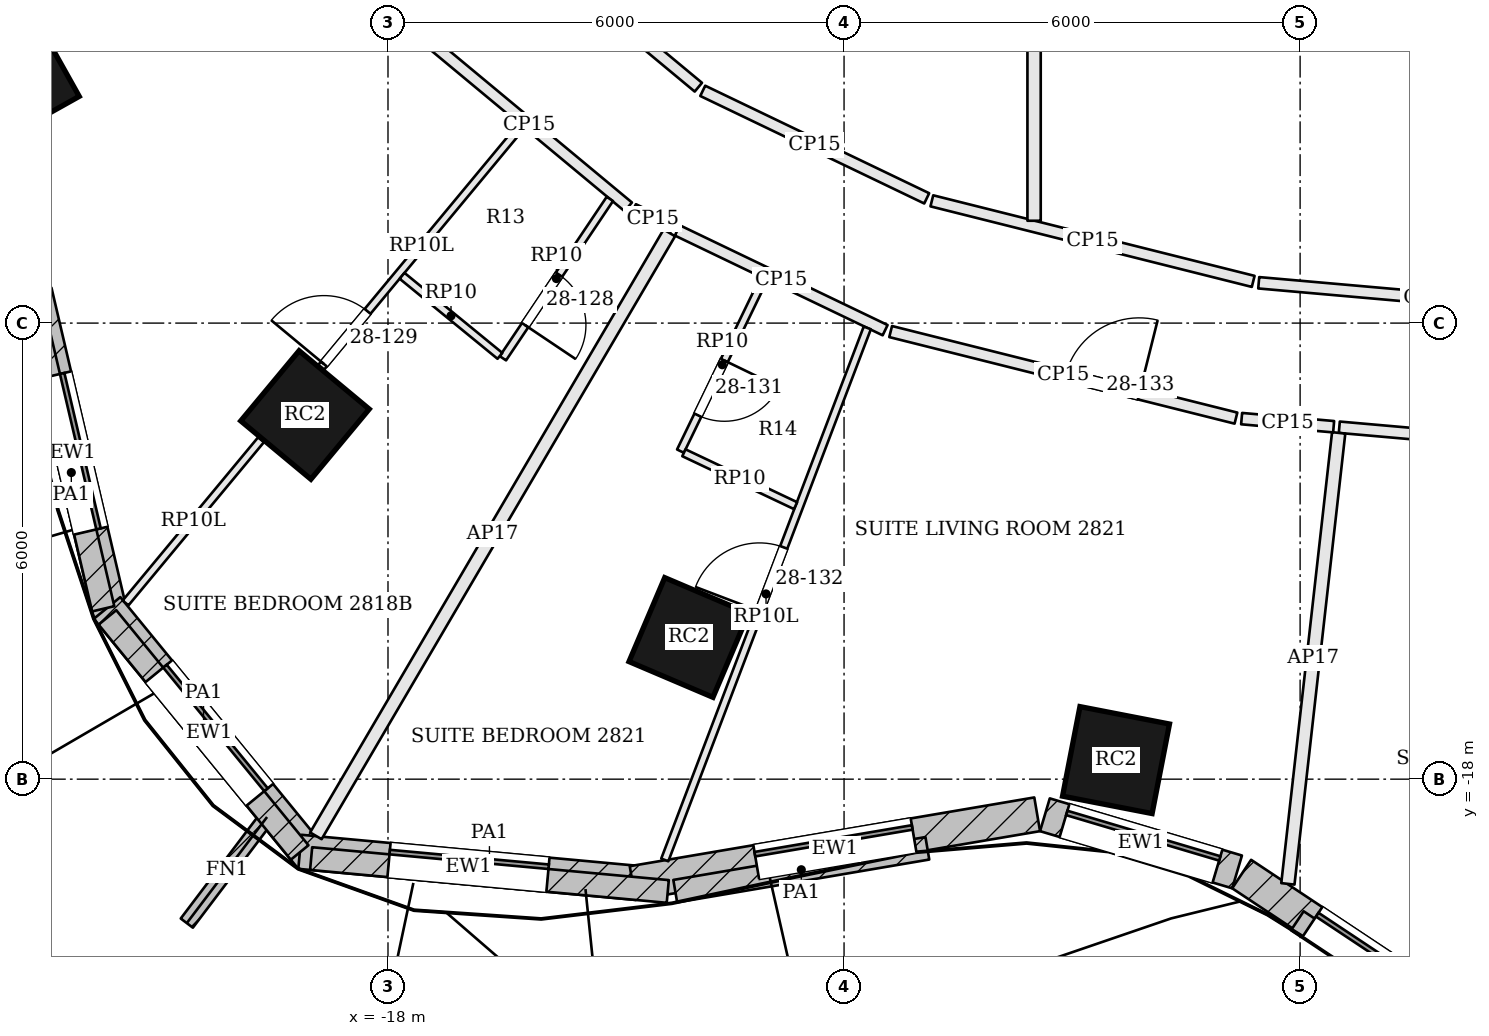
"""IFC4 building model, lengths in metres.
Left out: names, types, materials, properties, quantities, classifications, styles, units other than length and angle.
Written with IfcOpenShell. Run it as: python <this file> out.ifc"""

import sys

from ifc_helpers import new_model, si_unit, direction, frame, frame_2d, origin, origin_2d, place, context, subcontext, project, spatial, rectangle, extrude, element, fill, save


model = new_model("IFC4")
c1 = context("Model", 3, precision=1e-05, world=origin(), true_north=direction((0.0, 1.0)))
c2 = subcontext(c1, "Body", "Model", "MODEL_VIEW")
j1 = project(units=[si_unit("LENGTHUNIT", "METRE"), si_unit("PLANEANGLEUNIT", "RADIAN")], contexts=[c1])
p1 = place(None, origin())
s1 = spatial("IfcSite", under=j1, at=p1, CompositionType="ELEMENT")
p2 = place(p1, origin())
s2 = spatial("IfcBuilding", under=s1, at=p2, CompositionType="ELEMENT")
p3 = place(p2, frame((0.0, 0.0, 117.6)))
s3 = spatial("IfcBuildingStorey", under=s2, at=p3, CompositionType="ELEMENT", Elevation=117.6)
for number, where, z_axis, x_axis in (
    (1, (-22.879, -8.787, 0.0), (0.0, 0.0, 1.0), (0.489, -0.873, 0.0)),
    (2, (-19.092, -13.209, 0.0), (0.0, 0.0, 1.0), (0.769, -0.639, 0.0)),
    (3, (-14.042, -16.136, 0.0), (0.0, 0.0, 1.0), (0.92, -0.392, 0.0)),
    (4, (-8.422, -17.749, 0.0), (0.0, 0.0, 1.0), (0.982, -0.191, 0.0)),
):
    element("IfcColumn", number, at=place(p3, frame(where, z_axis=z_axis, x_axis=x_axis)), inside=s3, PredefinedType="COLUMN", context=c2, shape_type="SweptSolid", body=[
        extrude(rectangle(XDim=1.2, YDim=1.2, at=origin_2d()), origin(), (0.0, 0.0, 1.0), 2.8),
    ])
p4 = place(p3, frame((-22.646, -11.586, 0.0), z_axis=(0.0, 0.0, 1.0), x_axis=(0.227925124198, -0.973678662475, 0.0)))
e5 = element("IfcWall", 5, at=p4, inside=s3, PredefinedType="SOLIDWALL", context=c2, shape_type="SweptSolid", body=[
    extrude(rectangle(XDim=4.361, YDim=0.45, at=frame_2d((2.18, 0.0))), origin(), (0.0, 0.0, 1.0), 3.3),
])
p5 = place(p4, frame((1.13, 0.0, 0.9)))
e6 = element("IfcOpeningElement", 6, at=p5, cuts=e5, PredefinedType="OPENING", context=c2, shape_type="SweptSolid", body=[
    extrude(rectangle(XDim=2.1, YDim=1.8, at=frame_2d((1.05, 0.9))), frame((0.0, 0.235, 0.0), z_axis=(0.0, -1.0, 0.0), x_axis=(1.0, 0.0, 0.0)), (0.0, 0.0, 1.0), 0.47),
])
p6 = place(p3, frame((-21.696, -15.748, 0.0), z_axis=(0.0, 0.0, 1.0), x_axis=(0.632968710519, -0.774177377288, 0.0)))
e7 = element("IfcWall", 7, at=p6, inside=s3, PredefinedType="SOLIDWALL", context=c2, shape_type="SweptSolid", body=[
    extrude(rectangle(XDim=4.25, YDim=0.45, at=frame_2d((2.125, 0.0))), origin(), (0.0, 0.0, 1.0), 3.3),
])
p7 = place(p6, frame((1.075, 0.0, 0.9)))
e8 = element("IfcOpeningElement", 8, at=p7, cuts=e7, PredefinedType="OPENING", context=c2, shape_type="SweptSolid", body=[
    extrude(rectangle(XDim=2.1, YDim=1.8, at=frame_2d((1.05, 0.9))), frame((0.0, 0.235, 0.0), z_axis=(0.0, -1.0, 0.0), x_axis=(1.0, 0.0, 0.0)), (0.0, 0.0, 1.0), 0.47),
])
p8 = place(p3, frame((-19.159, -18.956, 0.0), z_axis=(0.0, 0.0, 1.0), x_axis=(0.995777399421, -0.091800712424, 0.0)))
e9 = element("IfcWall", 9, at=p8, inside=s3, PredefinedType="SOLIDWALL", context=c2, shape_type="SweptSolid", body=[
    extrude(rectangle(XDim=4.455, YDim=0.45, at=frame_2d((2.227, 0.0))), origin(), (0.0, 0.0, 1.0), 3.3),
])
p9 = place(p8, frame((1.177, 0.0, 0.9)))
e10 = element("IfcOpeningElement", 10, at=p9, cuts=e9, PredefinedType="OPENING", context=c2, shape_type="SweptSolid", body=[
    extrude(rectangle(XDim=2.1, YDim=1.8, at=frame_2d((1.05, 0.9))), frame((0.0, 0.235, 0.0), z_axis=(0.0, -1.0, 0.0), x_axis=(1.0, 0.0, 0.0)), (0.0, 0.0, 1.0), 0.47),
])
p10 = place(p3, frame((-14.782, -19.367, 0.0), z_axis=(0.0, 0.0, 1.0), x_axis=(0.98585584667, 0.167595493934, 0.0)))
e11 = element("IfcWall", 11, at=p10, inside=s3, PredefinedType="SOLIDWALL", context=c2, shape_type="SweptSolid", body=[
    extrude(rectangle(XDim=5.399, YDim=0.45, at=frame_2d((2.699, 0.0))), origin(), (0.0, 0.0, 1.0), 3.3),
])
p11 = place(p10, frame((1.649, 0.0, 0.9)))
e12 = element("IfcOpeningElement", 12, at=p11, cuts=e11, PredefinedType="OPENING", context=c2, shape_type="SweptSolid", body=[
    extrude(rectangle(XDim=2.1, YDim=1.8, at=frame_2d((1.05, 0.9))), frame((0.0, 0.235, 0.0), z_axis=(0.0, -1.0, 0.0), x_axis=(1.0, 0.0, 0.0)), (0.0, 0.0, 1.0), 0.47),
])
p12 = place(p3, frame((-9.357, -18.469, 0.0), z_axis=(0.0, 0.0, 1.0), x_axis=(0.958524054629, -0.285011643091, 0.0)))
e13 = element("IfcWall", 13, at=p12, inside=s3, PredefinedType="SOLIDWALL", context=c2, shape_type="SweptSolid", body=[
    extrude(rectangle(XDim=2.637, YDim=0.45, at=frame_2d((1.319, 0.0))), origin(), (0.0, 0.0, 1.0), 3.3),
])
p13 = place(p12, frame((0.269, 0.0, 0.9)))
e14 = element("IfcOpeningElement", 14, at=p13, cuts=e13, PredefinedType="OPENING", context=c2, shape_type="SweptSolid", body=[
    extrude(rectangle(XDim=2.1, YDim=1.8, at=frame_2d((1.05, 0.9))), frame((0.0, 0.235, 0.0), z_axis=(0.0, -1.0, 0.0), x_axis=(1.0, 0.0, 0.0)), (0.0, 0.0, 1.0), 0.47),
])
p14 = place(p3, frame((-6.769, -19.248, 0.0), z_axis=(0.0, 0.0, 1.0), x_axis=(0.832973379274, -0.553313066375, 0.0)))
e15 = element("IfcWall", 15, at=p14, inside=s3, PredefinedType="SOLIDWALL", context=c2, shape_type="SweptSolid", body=[
    extrude(rectangle(XDim=4.348, YDim=0.45, at=frame_2d((2.174, 0.0))), origin(), (0.0, 0.0, 1.0), 3.3),
])
p15 = place(p14, frame((1.124, 0.0, 0.9)))
e16 = element("IfcOpeningElement", 16, at=p15, cuts=e15, PredefinedType="OPENING", context=c2, shape_type="SweptSolid", body=[
    extrude(rectangle(XDim=2.1, YDim=1.8, at=frame_2d((1.05, 0.9))), frame((0.0, 0.235, 0.0), z_axis=(0.0, -1.0, 0.0), x_axis=(1.0, 0.0, 0.0)), (0.0, 0.0, 1.0), 0.47),
])
p16 = place(p3, frame((-19.591, -18.498, 0.0), z_axis=(0.0, 0.0, 1.0), x_axis=(-0.603387525063, -0.797448114048, 0.0)))
e17 = element("IfcWall", 17, at=p16, inside=s3, PredefinedType="SOLIDWALL", context=c2, shape_type="SweptSolid", body=[
    extrude(rectangle(XDim=1.75, YDim=0.2, at=frame_2d((0.875, 0.0))), origin(), (0.0, 0.0, 1.0), 3.3),
])
p17 = place(p3, frame((-22.586, -12.174, 3.6), z_axis=(0.0, 0.0, 1.0), x_axis=(0.227889817295, -0.973686926673, 0.0)))
e18 = element("IfcWall", 18, at=p17, inside=s3, PredefinedType="PARAPET", context=c2, shape_type="SweptSolid", body=[
    extrude(rectangle(XDim=3.682, YDim=0.3, at=frame_2d((1.841, 0.0))), origin(), (0.0, 0.0, 1.0), 1.1),
])
p18 = place(p3, frame((-21.691, -15.872, 3.6), z_axis=(0.0, 0.0, 1.0), x_axis=(0.632984818356, -0.774164207214, 0.0)))
e19 = element("IfcWall", 19, at=p18, inside=s3, PredefinedType="PARAPET", context=c2, shape_type="SweptSolid", body=[
    extrude(rectangle(XDim=3.995, YDim=0.3, at=frame_2d((1.997, 0.0))), origin(), (0.0, 0.0, 1.0), 1.1),
])
p19 = place(p3, frame((-19.011, -19.045, 3.6), z_axis=(0.0, 0.0, 1.0), x_axis=(0.995781185236, -0.091759637809, 0.0)))
e20 = element("IfcWall", 20, at=p19, inside=s3, PredefinedType="PARAPET", context=c2, shape_type="SweptSolid", body=[
    extrude(rectangle(XDim=4.712, YDim=0.3, at=frame_2d((2.356, 0.0))), origin(), (0.0, 0.0, 1.0), 1.1),
])
p20 = place(p3, frame((-14.221, -19.473, 3.6), z_axis=(0.0, 0.0, 1.0), x_axis=(0.985863279186, 0.167551767381, 0.0)))
e21 = element("IfcWall", 21, at=p20, inside=s3, PredefinedType="PARAPET", context=c2, shape_type="SweptSolid", body=[
    extrude(rectangle(XDim=3.365, YDim=0.3, at=frame_2d((1.682, 0.0))), origin(), (0.0, 0.0, 1.0), 1.1),
])
p21 = place(p3, frame((-6.037, -19.863, 3.6), z_axis=(0.0, 0.0, 1.0), x_axis=(0.832989992548, -0.553288055459, 0.0)))
e22 = element("IfcWall", 22, at=p21, inside=s3, PredefinedType="PARAPET", context=c2, shape_type="SweptSolid", body=[
    extrude(rectangle(XDim=3.154, YDim=0.3, at=frame_2d((1.577, 0.0))), origin(), (0.0, 0.0, 1.0), 1.1),
])
p22 = place(p3, frame((-5.484, -13.37, 0.0), z_axis=(0.0, 0.0, 1.0), x_axis=(0.996140545205, -0.087772513919, 0.0)))
e23 = element("IfcWall", 23, at=p22, inside=s3, PredefinedType="PARTITIONING", context=c2, shape_type="SweptSolid", body=[
    extrude(rectangle(XDim=3.466, YDim=0.15, at=frame_2d((1.733, 0.0))), origin(), (0.0, 0.0, 1.0), 2.684),
])
p23 = place(p3, frame((-6.161, -19.377, 0.0), z_axis=(0.0, 0.0, 1.0), x_axis=(0.111916919639, 0.993717567067, 0.0)))
e24 = element("IfcWall", 24, at=p23, inside=s3, PredefinedType="PARTITIONING", context=c2, shape_type="SweptSolid", body=[
    extrude(rectangle(XDim=5.971, YDim=0.175, at=frame_2d((2.985, 0.0))), origin(), (0.0, 0.0, 1.0), 2.684),
])
p24 = place(p3, frame((-17.446, -8.304, 0.0), z_axis=(0.0, 0.0, 1.0), x_axis=(0.769200174495, -0.639007896318, 0.0)))
e25 = element("IfcWall", 25, at=p24, inside=s3, PredefinedType="PARTITIONING", context=c2, shape_type="SweptSolid", body=[
    extrude(rectangle(XDim=3.39, YDim=0.15, at=frame_2d((1.695, 0.0))), origin(), (0.0, 0.0, 1.0), 2.684),
])
p25 = place(p3, frame((-14.771, -10.503, 0.0), z_axis=(0.0, 0.0, 1.0), x_axis=(0.901637414301, -0.432492743445, 0.0)))
e26 = element("IfcWall", 26, at=p25, inside=s3, PredefinedType="PARTITIONING", context=c2, shape_type="SweptSolid", body=[
    extrude(rectangle(XDim=0.566, YDim=0.15, at=frame_2d((0.283, 0.0))), origin(), (0.0, 0.0, 1.0), 2.684),
])
p26 = place(p3, frame((-18.949, -18.745, 0.0), z_axis=(0.0, 0.0, 1.0), x_axis=(0.505730402321, 0.862691578821, 0.0)))
e27 = element("IfcWall", 27, at=p26, inside=s3, PredefinedType="PARTITIONING", context=c2, shape_type="SweptSolid", body=[
    extrude(rectangle(XDim=9.195, YDim=0.175, at=frame_2d((4.597, 0.0))), origin(), (0.0, 0.0, 1.0), 2.684),
])
p27 = place(p3, frame((-14.193, -10.781, 0.0), z_axis=(0.0, 0.0, 1.0), x_axis=(0.901494156461, -0.432791272863, 0.0)))
e28 = element("IfcWall", 28, at=p27, inside=s3, PredefinedType="PARTITIONING", context=c2, shape_type="SweptSolid", body=[
    extrude(rectangle(XDim=3.032, YDim=0.15, at=frame_2d((1.516, 0.0))), origin(), (0.0, 0.0, 1.0), 2.684),
])
p28 = place(p3, frame((-11.387, -12.111, 0.0), z_axis=(0.0, 0.0, 1.0), x_axis=(0.96999205549, -0.243136612393, 0.0)))
e29 = element("IfcWall", 29, at=p28, inside=s3, PredefinedType="PARTITIONING", context=c2, shape_type="SweptSolid", body=[
    extrude(rectangle(XDim=4.683, YDim=0.15, at=frame_2d((2.342, 0.0))), origin(), (0.0, 0.0, 1.0), 2.684),
])
p29 = place(p28, frame((2.371, 0.0, 0.0)))
e30 = element("IfcOpeningElement", 30, at=p29, cuts=e29, PredefinedType="OPENING", context=c2, shape_type="SweptSolid", body=[
    extrude(rectangle(XDim=1.0, YDim=2.1, at=frame_2d((0.5, 1.05))), frame((0.0, 0.085, 0.0), z_axis=(0.0, -1.0, 0.0), x_axis=(1.0, 0.0, 0.0)), (0.0, 0.0, 1.0), 0.17),
])
p30 = place(p3, frame((-6.77, -13.257, 0.0), z_axis=(0.0, 0.0, 1.0), x_axis=(0.996138123663, -0.08779999194, 0.0)))
e31 = element("IfcWall", 31, at=p30, inside=s3, PredefinedType="PARTITIONING", context=c2, shape_type="SweptSolid", body=[
    extrude(rectangle(XDim=1.215, YDim=0.15, at=frame_2d((0.607, 0.0))), origin(), (0.0, 0.0, 1.0), 2.684),
])
p31 = place(p3, frame((-2.051, -11.865, 0.0), z_axis=(0.0, 0.0, 1.0), x_axis=(-0.996139599493, 0.087783246245, 0.0)))
e32 = element("IfcWall", 32, at=p31, inside=s3, PredefinedType="PARTITIONING", context=c2, shape_type="SweptSolid", body=[
    extrude(rectangle(XDim=4.511, YDim=0.15, at=frame_2d((2.255, 0.0))), origin(), (0.0, 0.0, 1.0), 2.684),
])
p32 = place(p3, frame((-6.617, -11.451, 0.0), z_axis=(0.0, 0.0, 1.0), x_axis=(-0.969987441267, 0.243155020069, 0.0)))
e33 = element("IfcWall", 33, at=p32, inside=s3, PredefinedType="PARTITIONING", context=c2, shape_type="SweptSolid", body=[
    extrude(rectangle(XDim=4.359, YDim=0.15, at=frame_2d((2.179, 0.0))), origin(), (0.0, 0.0, 1.0), 2.684),
])
p33 = place(p3, frame((-10.913, -10.359, 0.0), z_axis=(0.0, 0.0, 1.0), x_axis=(-0.90149741277, 0.432784489982, 0.0)))
e34 = element("IfcWall", 34, at=p33, inside=s3, PredefinedType="PARTITIONING", context=c2, shape_type="SweptSolid", body=[
    extrude(rectangle(XDim=3.269, YDim=0.15, at=frame_2d((1.634, 0.0))), origin(), (0.0, 0.0, 1.0), 2.684),
])
p34 = place(p3, frame((-13.917, -8.896, 0.0), z_axis=(0.0, 0.0, 1.0), x_axis=(-0.769130409479, 0.639091866021, 0.0)))
e35 = element("IfcWall", 35, at=p34, inside=s3, PredefinedType="PARTITIONING", context=c2, shape_type="SweptSolid", body=[
    extrude(rectangle(XDim=2.925, YDim=0.15, at=frame_2d((1.462, 0.0))), origin(), (0.0, 0.0, 1.0), 2.684),
])
p35 = place(p3, frame((-21.453, -15.682, 0.0), z_axis=(0.0, 0.0, 1.0), x_axis=(0.638677193702, 0.769474783371, 0.0)))
e36 = element("IfcWall", 36, at=p35, inside=s3, PredefinedType="PARTITIONING", context=c2, shape_type="SweptSolid", body=[
    extrude(rectangle(XDim=2.791, YDim=0.1, at=frame_2d((1.395, 0.0))), origin(), (0.0, 0.0, 1.0), 2.28),
])
p36 = place(p3, frame((-18.878, -12.58, 0.0), z_axis=(0.0, 0.0, 1.0), x_axis=(0.638746790079, 0.769417011876, 0.0)))
e37 = element("IfcWall", 37, at=p36, inside=s3, PredefinedType="PARTITIONING", context=c2, shape_type="SweptSolid", body=[
    extrude(rectangle(XDim=4.129, YDim=0.1, at=frame_2d((2.064, 0.0))), origin(), (0.0, 0.0, 1.0), 2.28),
])
p37 = place(p36, frame((0.055, 0.0, 0.0)))
e38 = element("IfcOpeningElement", 38, at=p37, cuts=e37, PredefinedType="OPENING", context=c2, shape_type="SweptSolid", body=[
    extrude(rectangle(XDim=0.9, YDim=2.1, at=frame_2d((0.45, 1.05))), frame((0.0, 0.06, 0.0), z_axis=(0.0, -1.0, 0.0), x_axis=(1.0, 0.0, 0.0)), (0.0, 0.0, 1.0), 0.12),
])
p38 = place(p3, frame((-15.081, -10.366, 0.0), z_axis=(0.0, 0.0, 1.0), x_axis=(-0.557375152116, -0.830260766147, 0.0)))
e39 = element("IfcWall", 39, at=p38, inside=s3, PredefinedType="PARTITIONING", context=c2, shape_type="SweptSolid", body=[
    extrude(rectangle(XDim=2.525, YDim=0.1, at=frame_2d((1.262, 0.0))), origin(), (0.0, 0.0, 1.0), 2.684),
])
p39 = place(p38, frame((1.2, 0.0, 0.0)))
e40 = element("IfcOpeningElement", 40, at=p39, cuts=e39, PredefinedType="OPENING", context=c2, shape_type="SweptSolid", body=[
    extrude(rectangle(XDim=0.8, YDim=2.1, at=frame_2d((0.4, 1.05))), frame((0.0, 0.06, 0.0), z_axis=(0.0, -1.0, 0.0), x_axis=(1.0, 0.0, 0.0)), (0.0, 0.0, 1.0), 0.12),
])
p40 = place(p3, frame((-16.527, -12.431, 0.0), z_axis=(0.0, 0.0, 1.0), x_axis=(-0.774094584634, 0.633069959831, 0.0)))
e41 = element("IfcWall", 41, at=p40, inside=s3, PredefinedType="PARTITIONING", context=c2, shape_type="SweptSolid", body=[
    extrude(rectangle(XDim=1.664, YDim=0.1, at=frame_2d((0.832, 0.0))), origin(), (0.0, 0.0, 1.0), 2.684),
])
p41 = place(p3, frame((-14.359, -19.063, 0.0), z_axis=(0.0, 0.0, 1.0), x_axis=(0.355741824807, 0.934584268048, 0.0)))
e42 = element("IfcWall", 42, at=p41, inside=s3, PredefinedType="PARTITIONING", context=c2, shape_type="SweptSolid", body=[
    extrude(rectangle(XDim=7.49, YDim=0.1, at=frame_2d((3.745, 0.0))), origin(), (0.0, 0.0, 1.0), 2.28),
])
p42 = place(p41, frame((3.5, 0.0, 0.0)))
e43 = element("IfcOpeningElement", 43, at=p42, cuts=e42, PredefinedType="OPENING", context=c2, shape_type="SweptSolid", body=[
    extrude(rectangle(XDim=0.9, YDim=2.1, at=frame_2d((0.45, 1.05))), frame((0.0, 0.06, 0.0), z_axis=(0.0, -1.0, 0.0), x_axis=(1.0, 0.0, 0.0)), (0.0, 0.0, 1.0), 0.12),
])
p43 = place(p3, frame((-13.052, -11.412, 0.0), z_axis=(0.0, 0.0, 1.0), x_axis=(-0.435495216355, -0.900191044463, 0.0)))
e44 = element("IfcWall", 44, at=p43, inside=s3, PredefinedType="PARTITIONING", context=c2, shape_type="SweptSolid", body=[
    extrude(rectangle(XDim=2.525, YDim=0.1, at=frame_2d((1.262, 0.0))), origin(), (0.0, 0.0, 1.0), 2.684),
])
p44 = place(p43, frame((1.2, 0.0, 0.0)))
e45 = element("IfcOpeningElement", 45, at=p44, cuts=e44, PredefinedType="OPENING", context=c2, shape_type="SweptSolid", body=[
    extrude(rectangle(XDim=0.8, YDim=2.1, at=frame_2d((0.4, 1.05))), frame((0.0, 0.06, 0.0), z_axis=(0.0, -1.0, 0.0), x_axis=(1.0, 0.0, 0.0)), (0.0, 0.0, 1.0), 0.12),
])
p45 = place(p3, frame((-14.107, -13.706, 0.0), z_axis=(0.0, 0.0, 1.0), x_axis=(0.903774530785, -0.428008875497, 0.0)))
e46 = element("IfcWall", 46, at=p45, inside=s3, PredefinedType="PARTITIONING", context=c2, shape_type="SweptSolid", body=[
    extrude(rectangle(XDim=1.626, YDim=0.1, at=frame_2d((0.813, 0.0))), origin(), (0.0, 0.0, 1.0), 2.684),
])
p46 = place(p3, frame((-9.5, -10.654, 0.0), z_axis=(0.0, 0.0, 1.0), x_axis=(0.0, 1.0, 0.0)))
e47 = element("IfcWall", 47, at=p46, inside=s3, PredefinedType="PARTITIONING", context=c2, shape_type="SweptSolid", body=[
    extrude(rectangle(XDim=5.779, YDim=0.175, at=frame_2d((2.889, 0.0))), origin(), (0.0, 0.0, 1.0), 2.684),
])
p47 = place(p5, origin())
e48 = element("IfcWindow", 48, at=p47, inside=s3, PartitioningType="SINGLE_PANEL", PredefinedType="WINDOW", context=c2, shape_type="SweptSolid", body=[
    extrude(rectangle(XDim=2.1, YDim=1.8, at=frame_2d((1.05, 0.9))), frame((0.0, 0.135, 0.0), z_axis=(0.0, -1.0, 0.0), x_axis=(1.0, 0.0, 0.0)), (0.0, 0.0, 1.0), 0.06),
])
fill(e6, e48)
p48 = place(p7, origin())
e49 = element("IfcWindow", 49, at=p48, inside=s3, PartitioningType="SINGLE_PANEL", PredefinedType="WINDOW", context=c2, shape_type="SweptSolid", body=[
    extrude(rectangle(XDim=2.1, YDim=1.8, at=frame_2d((1.05, 0.9))), frame((0.0, 0.135, 0.0), z_axis=(0.0, -1.0, 0.0), x_axis=(1.0, 0.0, 0.0)), (0.0, 0.0, 1.0), 0.06),
])
fill(e8, e49)
p49 = place(p9, origin())
e50 = element("IfcWindow", 50, at=p49, inside=s3, PartitioningType="SINGLE_PANEL", PredefinedType="WINDOW", context=c2, shape_type="SweptSolid", body=[
    extrude(rectangle(XDim=2.1, YDim=1.8, at=frame_2d((1.05, 0.9))), frame((0.0, 0.135, 0.0), z_axis=(0.0, -1.0, 0.0), x_axis=(1.0, 0.0, 0.0)), (0.0, 0.0, 1.0), 0.06),
])
fill(e10, e50)
p50 = place(p11, origin())
e51 = element("IfcWindow", 51, at=p50, inside=s3, PartitioningType="SINGLE_PANEL", PredefinedType="WINDOW", context=c2, shape_type="SweptSolid", body=[
    extrude(rectangle(XDim=2.1, YDim=1.8, at=frame_2d((1.05, 0.9))), frame((0.0, 0.135, 0.0), z_axis=(0.0, -1.0, 0.0), x_axis=(1.0, 0.0, 0.0)), (0.0, 0.0, 1.0), 0.06),
])
fill(e12, e51)
p51 = place(p13, origin())
e52 = element("IfcWindow", 52, at=p51, inside=s3, PartitioningType="SINGLE_PANEL", PredefinedType="WINDOW", context=c2, shape_type="SweptSolid", body=[
    extrude(rectangle(XDim=2.1, YDim=1.8, at=frame_2d((1.05, 0.9))), frame((0.0, 0.135, 0.0), z_axis=(0.0, -1.0, 0.0), x_axis=(1.0, 0.0, 0.0)), (0.0, 0.0, 1.0), 0.06),
])
fill(e14, e52)
p52 = place(p15, origin())
e53 = element("IfcWindow", 53, at=p52, inside=s3, PartitioningType="SINGLE_PANEL", PredefinedType="WINDOW", context=c2, shape_type="SweptSolid", body=[
    extrude(rectangle(XDim=2.1, YDim=1.8, at=frame_2d((1.05, 0.9))), frame((0.0, 0.135, 0.0), z_axis=(0.0, -1.0, 0.0), x_axis=(1.0, 0.0, 0.0)), (0.0, 0.0, 1.0), 0.06),
])
fill(e16, e53)
p53 = place(p39, origin())
e54 = element("IfcDoor", 54, at=p53, inside=s3, OperationType="SINGLE_SWING_RIGHT", PredefinedType="DOOR", context=c2, shape_type="SweptSolid", body=[
    extrude(rectangle(XDim=0.8, YDim=2.1, at=frame_2d((0.4, 1.05))), frame((0.0, 0.025, 0.0), z_axis=(0.0, -1.0, 0.0), x_axis=(1.0, 0.0, 0.0)), (0.0, 0.0, 1.0), 0.05),
])
fill(e40, e54)
p54 = place(p37, origin())
e55 = element("IfcDoor", 55, at=p54, inside=s3, OperationType="SINGLE_SWING_LEFT", PredefinedType="DOOR", context=c2, shape_type="SweptSolid", body=[
    extrude(rectangle(XDim=0.9, YDim=2.1, at=frame_2d((0.45, 1.05))), frame((0.0, 0.025, 0.0), z_axis=(0.0, -1.0, 0.0), x_axis=(1.0, 0.0, 0.0)), (0.0, 0.0, 1.0), 0.05),
])
fill(e38, e55)
p55 = place(p44, origin())
e56 = element("IfcDoor", 56, at=p55, inside=s3, OperationType="SINGLE_SWING_LEFT", PredefinedType="DOOR", context=c2, shape_type="SweptSolid", body=[
    extrude(rectangle(XDim=0.8, YDim=2.1, at=frame_2d((0.4, 1.05))), frame((0.0, 0.025, 0.0), z_axis=(0.0, -1.0, 0.0), x_axis=(1.0, 0.0, 0.0)), (0.0, 0.0, 1.0), 0.05),
])
fill(e45, e56)
p56 = place(p42, origin())
e57 = element("IfcDoor", 57, at=p56, inside=s3, OperationType="SINGLE_SWING_LEFT", PredefinedType="DOOR", context=c2, shape_type="SweptSolid", body=[
    extrude(rectangle(XDim=0.9, YDim=2.1, at=frame_2d((0.45, 1.05))), frame((0.0, 0.025, 0.0), z_axis=(0.0, -1.0, 0.0), x_axis=(1.0, 0.0, 0.0)), (0.0, 0.0, 1.0), 0.05),
])
fill(e43, e57)
p57 = place(p29, origin())
e58 = element("IfcDoor", 58, at=p57, inside=s3, OperationType="SINGLE_SWING_RIGHT", PredefinedType="DOOR", context=c2, shape_type="SweptSolid", body=[
    extrude(rectangle(XDim=1.0, YDim=2.1, at=frame_2d((0.5, 1.05))), frame((0.0, 0.025, 0.0), z_axis=(0.0, -1.0, 0.0), x_axis=(1.0, 0.0, 0.0)), (0.0, 0.0, 1.0), 0.05),
])
fill(e30, e58)
save(model, sys.argv[1])
